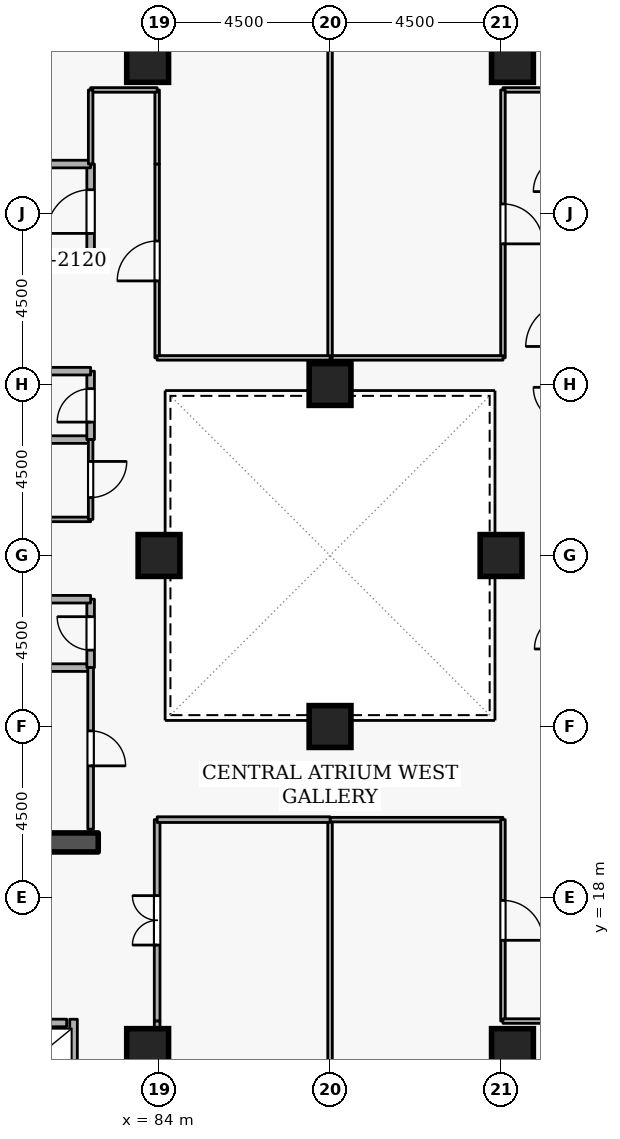
"""IFC4 building model, lengths in metres.
Left out: names, types, materials, properties, quantities, classifications, styles, units other than length and angle.
Written with IfcOpenShell. Run it as: python <this file> out.ifc"""

import sys

from ifc_helpers import new_model, si_unit, direction, frame, frame_2d, origin, origin_2d, place, context, subcontext, project, spatial, rectangle, extrude, element, fill, save


model = new_model("IFC4")
c1 = context("Model", 3, precision=1e-05, world=origin(), true_north=direction((0.0, 1.0)))
c2 = subcontext(c1, "Body", "Model", "MODEL_VIEW")
j1 = project(units=[si_unit("LENGTHUNIT", "METRE"), si_unit("PLANEANGLEUNIT", "RADIAN")], contexts=[c1])
p1 = place(None, origin())
s1 = spatial("IfcSite", under=j1, at=p1, CompositionType="ELEMENT")
p2 = place(p1, origin())
s2 = spatial("IfcBuilding", under=s1, at=p2, CompositionType="ELEMENT")
p3 = place(p2, frame((0.0, 0.0, 178.5)))
s3 = spatial("IfcBuildingStorey", under=s2, at=p3, CompositionType="ELEMENT", Elevation=178.5)
p4 = place(p3, frame((76.6, 19.45, 0.0), z_axis=(0.0, 0.0, 1.0), x_axis=(1.0, 0.0, 0.0)))
e1 = element("IfcWall", 1, at=p4, inside=s3, PredefinedType="SHEAR", context=c2, shape_type="SweptSolid", body=[
    extrude(rectangle(XDim=5.8, YDim=0.5, at=frame_2d((2.9, 0.0))), origin(), (0.0, 0.0, 1.0), 3.6),
])
for number, where, z_axis, x_axis in (
    (2, (93.3, 14.0, 0.0), (0.0, 0.0, 1.0), (1.0, 0.0, 0.0)),
    (3, (93.3, 40.0, 0.0), (0.0, 0.0, 1.0), (1.0, 0.0, 0.0)),
    (4, (83.7, 14.0, 0.0), (0.0, 0.0, 1.0), (1.0, 0.0, 0.0)),
    (5, (83.7, 40.0, 0.0), (0.0, 0.0, 1.0), (1.0, 0.0, 0.0)),
    (6, (93.0, 27.0, 0.0), (0.0, 0.0, 1.0), (1.0, 0.0, 0.0)),
    (7, (84.0, 27.0, 0.0), (0.0, 0.0, 1.0), (1.0, 0.0, 0.0)),
    (8, (88.5, 22.5, 0.0), (0.0, 0.0, 1.0), (1.0, 0.0, 0.0)),
    (9, (88.5, 31.5, 0.0), (0.0, 0.0, 1.0), (1.0, 0.0, 0.0)),
):
    element("IfcColumn", number, at=place(p3, frame(where, z_axis=z_axis, x_axis=x_axis)), inside=s3, PredefinedType="COLUMN", context=c2, shape_type="SweptSolid", body=[
        extrude(rectangle(XDim=1.1, YDim=1.1, at=origin_2d()), origin(), (0.0, 0.0, 1.0), 3.6),
    ])
p5 = place(p3, frame((79.63, 14.7, 0.0), z_axis=(0.0, 0.0, 1.0), x_axis=(1.0, 0.0, 0.0)))
e10 = element("IfcWall", 10, at=p5, inside=s3, PredefinedType="STANDARD", context=c2, shape_type="SweptSolid", body=[
    extrude(rectangle(XDim=1.94, YDim=0.2, at=frame_2d((0.97, 0.0))), origin(), (0.0, 0.0, 1.0), 3.34),
])
p6 = place(p5, frame((0.46, 0.0, 0.0)))
e11 = element("IfcOpeningElement", 11, at=p6, cuts=e10, PredefinedType="OPENING", context=c2, shape_type="SweptSolid", body=[
    extrude(rectangle(XDim=1.02, YDim=2.06, at=frame_2d((0.51, 1.03))), frame((0.0, 0.11, 0.0), z_axis=(0.0, -1.0, 0.0), x_axis=(1.0, 0.0, 0.0)), (0.0, 0.0, 1.0), 0.22),
])
p7 = place(p3, frame((81.75, 12.612, 0.0), z_axis=(0.0, 0.0, 1.0), x_axis=(0.0, 1.0, 0.0)))
e12 = element("IfcWall", 12, at=p7, inside=s3, PredefinedType="STANDARD", context=c2, shape_type="SweptSolid", body=[
    extrude(rectangle(XDim=2.186, YDim=0.2, at=frame_2d((1.093, 0.0))), origin(), (0.0, 0.0, 1.0), 3.34),
])
p8 = place(p3, frame((79.9, 34.8, 0.0), z_axis=(0.0, 0.0, 1.0), x_axis=(1.0, 0.0, 0.0)))
e13 = element("IfcWall", 13, at=p8, inside=s3, PredefinedType="STANDARD", context=c2, shape_type="SweptSolid", body=[
    extrude(rectangle(XDim=2.3, YDim=0.2, at=frame_2d((1.15, 0.0))), origin(), (0.0, 0.0, 1.0), 2.545),
])
p9 = place(p3, frame((82.2, 34.8, 0.0), z_axis=(0.0, 0.0, 1.0), x_axis=(0.0, 1.0, 0.0)))
e14 = element("IfcWall", 14, at=p9, inside=s3, PredefinedType="STANDARD", context=c2, shape_type="SweptSolid", body=[
    extrude(rectangle(XDim=2.5, YDim=0.2, at=frame_2d((1.25, 0.0))), origin(), (0.0, 0.0, 1.0), 3.34),
])
p10 = place(p9, frame((0.675, 0.0, 0.0)))
e15 = element("IfcOpeningElement", 15, at=p10, cuts=e14, PredefinedType="OPENING", context=c2, shape_type="SweptSolid", body=[
    extrude(rectangle(XDim=1.15, YDim=2.1, at=frame_2d((0.575, 1.05))), frame((0.0, 0.11, 0.0), z_axis=(0.0, -1.0, 0.0), x_axis=(1.0, 0.0, 0.0)), (0.0, 0.0, 1.0), 0.22),
])
p11 = place(p3, frame((82.2, 37.3, 0.0), z_axis=(0.0, 0.0, 1.0), x_axis=(-1.0, 0.0, 0.0)))
e16 = element("IfcWall", 16, at=p11, inside=s3, PredefinedType="STANDARD", context=c2, shape_type="SweptSolid", body=[
    extrude(rectangle(XDim=5.7, YDim=0.2, at=frame_2d((2.85, 0.0))), origin(), (0.0, 0.0, 1.0), 3.34),
])
p12 = place(p3, frame((80.15, 24.05, 0.0), z_axis=(0.0, 0.0, 1.0), x_axis=(1.0, 0.0, 0.0)))
e17 = element("IfcWall", 17, at=p12, inside=s3, PredefinedType="STANDARD", context=c2, shape_type="SweptSolid", body=[
    extrude(rectangle(XDim=2.05, YDim=0.2, at=frame_2d((1.025, 0.0))), origin(), (0.0, 0.0, 1.0), 3.34),
])
p13 = place(p3, frame((82.2, 24.05, 0.0), z_axis=(0.0, 0.0, 1.0), x_axis=(0.0, 1.0, 0.0)))
e18 = element("IfcWall", 18, at=p13, inside=s3, PredefinedType="STANDARD", context=c2, shape_type="SweptSolid", body=[
    extrude(rectangle(XDim=1.8, YDim=0.2, at=frame_2d((0.9, 0.0))), origin(), (0.0, 0.0, 1.0), 3.34),
])
p14 = place(p13, frame((0.46, 0.0, 0.0)))
e19 = element("IfcOpeningElement", 19, at=p14, cuts=e18, PredefinedType="OPENING", context=c2, shape_type="SweptSolid", body=[
    extrude(rectangle(XDim=0.88, YDim=2.04, at=frame_2d((0.44, 1.02))), frame((0.0, 0.11, 0.0), z_axis=(0.0, -1.0, 0.0), x_axis=(1.0, 0.0, 0.0)), (0.0, 0.0, 1.0), 0.22),
])
for number, where, z_axis, x_axis in (
    (20, (82.2, 25.85, 0.0), (0.0, 0.0, 1.0), (-1.0, 0.0, 0.0)),
    (21, (80.15, 30.05, 0.0), (0.0, 0.0, 1.0), (1.0, 0.0, 0.0)),
):
    element("IfcWall", number, at=place(p3, frame(where, z_axis=z_axis, x_axis=x_axis)), inside=s3, PredefinedType="STANDARD", context=c2, shape_type="SweptSolid", body=[
        extrude(rectangle(XDim=2.05, YDim=0.2, at=frame_2d((1.025, 0.0))), origin(), (0.0, 0.0, 1.0), 3.34),
    ])
p15 = place(p3, frame((82.2, 30.05, 0.0), z_axis=(0.0, 0.0, 1.0), x_axis=(0.0, 1.0, 0.0)))
e22 = element("IfcWall", 22, at=p15, inside=s3, PredefinedType="STANDARD", context=c2, shape_type="SweptSolid", body=[
    extrude(rectangle(XDim=1.8, YDim=0.2, at=frame_2d((0.9, 0.0))), origin(), (0.0, 0.0, 1.0), 3.34),
])
p16 = place(p15, frame((0.46, 0.0, 0.0)))
e23 = element("IfcOpeningElement", 23, at=p16, cuts=e22, PredefinedType="OPENING", context=c2, shape_type="SweptSolid", body=[
    extrude(rectangle(XDim=0.88, YDim=2.04, at=frame_2d((0.44, 1.02))), frame((0.0, 0.11, 0.0), z_axis=(0.0, -1.0, 0.0), x_axis=(1.0, 0.0, 0.0)), (0.0, 0.0, 1.0), 0.22),
])
p17 = place(p3, frame((82.2, 31.85, 0.0), z_axis=(0.0, 0.0, 1.0), x_axis=(-1.0, 0.0, 0.0)))
e24 = element("IfcWall", 24, at=p17, inside=s3, PredefinedType="STANDARD", context=c2, shape_type="SweptSolid", body=[
    extrude(rectangle(XDim=2.05, YDim=0.2, at=frame_2d((1.025, 0.0))), origin(), (0.0, 0.0, 1.0), 3.34),
])
p18 = place(p3, frame((82.2, 24.05, 0.0), z_axis=(0.0, 0.0, 1.0), x_axis=(0.0, -1.0, 0.0)))
e25 = element("IfcWall", 25, at=p18, inside=s3, PredefinedType="PARTITIONING", context=c2, shape_type="SweptSolid", body=[
    extrude(rectangle(XDim=4.25, YDim=0.15, at=frame_2d((2.125, 0.0))), origin(), (0.0, 0.0, 1.0), 3.34),
])
p19 = place(p18, frame((1.665, 0.0, 0.0)))
e26 = element("IfcOpeningElement", 26, at=p19, cuts=e25, PredefinedType="OPENING", context=c2, shape_type="SweptSolid", body=[
    extrude(rectangle(XDim=0.92, YDim=2.08, at=frame_2d((0.46, 1.04))), frame((0.0, 0.085, 0.0), z_axis=(0.0, -1.0, 0.0), x_axis=(1.0, 0.0, 0.0)), (0.0, 0.0, 1.0), 0.17),
])
p20 = place(p3, frame((82.2, 27.95, 0.0), z_axis=(0.0, 0.0, 1.0), x_axis=(-1.0, 0.0, 0.0)))
e27 = element("IfcWall", 27, at=p20, inside=s3, PredefinedType="PARTITIONING", context=c2, shape_type="SweptSolid", body=[
    extrude(rectangle(XDim=2.05, YDim=0.12, at=frame_2d((1.025, 0.0))), origin(), (0.0, 0.0, 1.0), 3.34),
])
p21 = place(p3, frame((82.2, 30.05, 0.0), z_axis=(0.0, 0.0, 1.0), x_axis=(0.0, -1.0, 0.0)))
e28 = element("IfcWall", 28, at=p21, inside=s3, PredefinedType="PARTITIONING", context=c2, shape_type="SweptSolid", body=[
    extrude(rectangle(XDim=2.1, YDim=0.12, at=frame_2d((1.05, 0.0))), origin(), (0.0, 0.0, 1.0), 3.34),
])
p22 = place(p21, frame((0.575, 0.0, 0.0)))
e29 = element("IfcOpeningElement", 29, at=p22, cuts=e28, PredefinedType="OPENING", context=c2, shape_type="SweptSolid", body=[
    extrude(rectangle(XDim=0.95, YDim=2.1, at=frame_2d((0.475, 1.05))), frame((0.0, 0.07, 0.0), z_axis=(0.0, -1.0, 0.0), x_axis=(1.0, 0.0, 0.0)), (0.0, 0.0, 1.0), 0.14),
])
p23 = place(p3, frame((88.5, 9.28, 0.0), z_axis=(0.0, 0.0, 1.0), x_axis=(0.0, 1.0, 0.0)))
e30 = element("IfcWall", 30, at=p23, inside=s3, PredefinedType="PARTITIONING", context=c2, shape_type="SweptSolid", body=[
    extrude(rectangle(XDim=10.77, YDim=0.12, at=frame_2d((5.385, 0.0))), origin(), (0.0, 0.0, 1.0), 2.932),
])
p24 = place(p3, frame((88.5, 20.05, 0.0), z_axis=(0.0, 0.0, 1.0), x_axis=(1.0, 0.0, 0.0)))
e31 = element("IfcWall", 31, at=p24, inside=s3, PredefinedType="PARTITIONING", context=c2, shape_type="SweptSolid", body=[
    extrude(rectangle(XDim=4.55, YDim=0.12, at=frame_2d((2.275, 0.0))), origin(), (0.0, 0.0, 1.0), 3.34),
])
p25 = place(p3, frame((93.05, 20.05, 0.0), z_axis=(0.0, 0.0, 1.0), x_axis=(0.0, -1.0, 0.0)))
e32 = element("IfcWall", 32, at=p25, inside=s3, PredefinedType="PARTITIONING", context=c2, shape_type="SweptSolid", body=[
    extrude(rectangle(XDim=5.3, YDim=0.12, at=frame_2d((2.65, 0.0))), origin(), (0.0, 0.0, 1.0), 3.34),
])
p26 = place(p25, frame((2.125, 0.0, 0.0)))
e33 = element("IfcOpeningElement", 33, at=p26, cuts=e32, PredefinedType="OPENING", context=c2, shape_type="SweptSolid", body=[
    extrude(rectangle(XDim=1.05, YDim=2.1, at=frame_2d((0.525, 1.05))), frame((0.0, 0.07, 0.0), z_axis=(0.0, -1.0, 0.0), x_axis=(1.0, 0.0, 0.0)), (0.0, 0.0, 1.0), 0.14),
])
p27 = place(p3, frame((93.05, 14.75, 0.0), z_axis=(0.0, 0.0, 1.0), x_axis=(1.0, 0.0, 0.0)))
e34 = element("IfcWall", 34, at=p27, inside=s3, PredefinedType="PARTITIONING", context=c2, shape_type="SweptSolid", body=[
    extrude(rectangle(XDim=1.75, YDim=0.12, at=frame_2d((0.875, 0.0))), origin(), (0.0, 0.0, 1.0), 3.34),
])
p28 = place(p3, frame((83.95, 14.75, 0.0), z_axis=(0.0, 0.0, 1.0), x_axis=(0.0, 1.0, 0.0)))
e35 = element("IfcWall", 35, at=p28, inside=s3, PredefinedType="PARTITIONING", context=c2, shape_type="SweptSolid", body=[
    extrude(rectangle(XDim=5.3, YDim=0.15, at=frame_2d((2.65, 0.0))), origin(), (0.0, 0.0, 1.0), 3.34),
])
p29 = place(p28, frame((2.0, 0.0, 0.0)))
e36 = element("IfcOpeningElement", 36, at=p29, cuts=e35, PredefinedType="OPENING", context=c2, shape_type="SweptSolid", body=[
    extrude(rectangle(XDim=1.3, YDim=2.12, at=frame_2d((0.65, 1.06))), frame((0.0, 0.085, 0.0), z_axis=(0.0, -1.0, 0.0), x_axis=(1.0, 0.0, 0.0)), (0.0, 0.0, 1.0), 0.17),
])
p30 = place(p3, frame((83.95, 20.05, 0.0), z_axis=(0.0, 0.0, 1.0), x_axis=(1.0, 0.0, 0.0)))
e37 = element("IfcWall", 37, at=p30, inside=s3, PredefinedType="PARTITIONING", context=c2, shape_type="SweptSolid", body=[
    extrude(rectangle(XDim=4.55, YDim=0.15, at=frame_2d((2.275, 0.0))), origin(), (0.0, 0.0, 1.0), 3.34),
])
p31 = place(p3, frame((83.95, 12.4, 0.0), z_axis=(0.0, 0.0, 1.0), x_axis=(0.0, 1.0, 0.0)))
e38 = element("IfcWall", 38, at=p31, inside=s3, PredefinedType="PARTITIONING", context=c2, shape_type="SweptSolid", body=[
    extrude(rectangle(XDim=2.35, YDim=0.15, at=frame_2d((1.175, 0.0))), origin(), (0.0, 0.0, 1.0), 3.34),
])
p32 = place(p3, frame((94.8, 39.25, 0.0), z_axis=(0.0, 0.0, 1.0), x_axis=(-1.0, 0.0, 0.0)))
e39 = element("IfcWall", 39, at=p32, inside=s3, PredefinedType="PARTITIONING", context=c2, shape_type="SweptSolid", body=[
    extrude(rectangle(XDim=1.75, YDim=0.12, at=frame_2d((0.875, 0.0))), origin(), (0.0, 0.0, 1.0), 3.34),
])
p33 = place(p3, frame((93.05, 39.25, 0.0), z_axis=(0.0, 0.0, 1.0), x_axis=(0.0, -1.0, 0.0)))
e40 = element("IfcWall", 40, at=p33, inside=s3, PredefinedType="PARTITIONING", context=c2, shape_type="SweptSolid", body=[
    extrude(rectangle(XDim=7.05, YDim=0.12, at=frame_2d((3.525, 0.0))), origin(), (0.0, 0.0, 1.0), 3.34),
])
p34 = place(p33, frame((3.0, 0.0, 0.0)))
e41 = element("IfcOpeningElement", 41, at=p34, cuts=e40, PredefinedType="OPENING", context=c2, shape_type="SweptSolid", body=[
    extrude(rectangle(XDim=1.05, YDim=2.1, at=frame_2d((0.525, 1.05))), frame((0.0, 0.07, 0.0), z_axis=(0.0, -1.0, 0.0), x_axis=(1.0, 0.0, 0.0)), (0.0, 0.0, 1.0), 0.14),
])
p35 = place(p3, frame((93.05, 32.2, 0.0), z_axis=(0.0, 0.0, 1.0), x_axis=(-1.0, 0.0, 0.0)))
e42 = element("IfcWall", 42, at=p35, inside=s3, PredefinedType="PARTITIONING", context=c2, shape_type="SweptSolid", body=[
    extrude(rectangle(XDim=4.55, YDim=0.12, at=frame_2d((2.275, 0.0))), origin(), (0.0, 0.0, 1.0), 3.34),
])
p36 = place(p3, frame((88.5, 32.2, 0.0), z_axis=(0.0, 0.0, 1.0), x_axis=(0.0, 1.0, 0.0)))
e43 = element("IfcWall", 43, at=p36, inside=s3, PredefinedType="PARTITIONING", context=c2, shape_type="SweptSolid", body=[
    extrude(rectangle(XDim=18.52, YDim=0.12, at=frame_2d((9.26, 0.0))), origin(), (0.0, 0.0, 1.0), 2.932),
])
p37 = place(p3, frame((83.95, 32.2, 0.0), z_axis=(0.0, 0.0, 1.0), x_axis=(0.0, 1.0, 0.0)))
e44 = element("IfcWall", 44, at=p37, inside=s3, PredefinedType="PARTITIONING", context=c2, shape_type="SweptSolid", body=[
    extrude(rectangle(XDim=5.1, YDim=0.12, at=frame_2d((2.55, 0.0))), origin(), (0.0, 0.0, 1.0), 3.34),
])
p38 = place(p37, frame((2.025, 0.0, 0.0)))
e45 = element("IfcOpeningElement", 45, at=p38, cuts=e44, PredefinedType="OPENING", context=c2, shape_type="SweptSolid", body=[
    extrude(rectangle(XDim=1.05, YDim=2.1, at=frame_2d((0.525, 1.05))), frame((0.0, 0.07, 0.0), z_axis=(0.0, -1.0, 0.0), x_axis=(1.0, 0.0, 0.0)), (0.0, 0.0, 1.0), 0.14),
])
p39 = place(p3, frame((83.95, 37.3, 0.0), z_axis=(0.0, 0.0, 1.0), x_axis=(0.0, 1.0, 0.0)))
e46 = element("IfcWall", 46, at=p39, inside=s3, PredefinedType="PARTITIONING", context=c2, shape_type="SweptSolid", body=[
    extrude(rectangle(XDim=1.95, YDim=0.12, at=frame_2d((0.975, 0.0))), origin(), (0.0, 0.0, 1.0), 3.34),
])
p40 = place(p3, frame((83.95, 39.25, 0.0), z_axis=(0.0, 0.0, 1.0), x_axis=(-1.0, 0.0, 0.0)))
e47 = element("IfcWall", 47, at=p40, inside=s3, PredefinedType="PARTITIONING", context=c2, shape_type="SweptSolid", body=[
    extrude(rectangle(XDim=1.75, YDim=0.12, at=frame_2d((0.875, 0.0))), origin(), (0.0, 0.0, 1.0), 3.34),
])
p41 = place(p3, frame((82.2, 39.25, 0.0), z_axis=(0.0, 0.0, 1.0), x_axis=(0.0, -1.0, 0.0)))
e48 = element("IfcWall", 48, at=p41, inside=s3, PredefinedType="PARTITIONING", context=c2, shape_type="SweptSolid", body=[
    extrude(rectangle(XDim=1.95, YDim=0.12, at=frame_2d((0.975, 0.0))), origin(), (0.0, 0.0, 1.0), 3.34),
])
p42 = place(p3, frame((88.5, 32.2, 0.0), z_axis=(0.0, 0.0, 1.0), x_axis=(-1.0, 0.0, 0.0)))
e49 = element("IfcWall", 49, at=p42, inside=s3, PredefinedType="PARTITIONING", context=c2, shape_type="SweptSolid", body=[
    extrude(rectangle(XDim=4.55, YDim=0.12, at=frame_2d((2.275, 0.0))), origin(), (0.0, 0.0, 1.0), 3.34),
])
p43 = place(p10, origin())
e50 = element("IfcDoor", 50, at=p43, inside=s3, OperationType="SINGLE_SWING_LEFT", PredefinedType="DOOR", context=c2, shape_type="SweptSolid", body=[
    extrude(rectangle(XDim=1.15, YDim=2.1, at=frame_2d((0.575, 1.05))), frame((0.0, 0.025, 0.0), z_axis=(0.0, -1.0, 0.0), x_axis=(1.0, 0.0, 0.0)), (0.0, 0.0, 1.0), 0.05),
])
fill(e15, e50)
p44 = place(p14, origin())
e51 = element("IfcDoor", 51, at=p44, inside=s3, OperationType="SINGLE_SWING_RIGHT", PredefinedType="DOOR", context=c2, shape_type="SweptSolid", body=[
    extrude(rectangle(XDim=0.88, YDim=2.04, at=frame_2d((0.44, 1.02))), frame((0.0, 0.025, 0.0), z_axis=(0.0, -1.0, 0.0), x_axis=(1.0, 0.0, 0.0)), (0.0, 0.0, 1.0), 0.05),
])
fill(e19, e51)
p45 = place(p16, origin())
e52 = element("IfcDoor", 52, at=p45, inside=s3, OperationType="SINGLE_SWING_LEFT", PredefinedType="DOOR", context=c2, shape_type="SweptSolid", body=[
    extrude(rectangle(XDim=0.88, YDim=2.04, at=frame_2d((0.44, 1.02))), frame((0.0, 0.025, 0.0), z_axis=(0.0, -1.0, 0.0), x_axis=(1.0, 0.0, 0.0)), (0.0, 0.0, 1.0), 0.05),
])
fill(e23, e52)
p46 = place(p19, origin())
e53 = element("IfcDoor", 53, at=p46, inside=s3, OperationType="SINGLE_SWING_RIGHT", PredefinedType="DOOR", context=c2, shape_type="SweptSolid", body=[
    extrude(rectangle(XDim=0.92, YDim=2.08, at=frame_2d((0.46, 1.04))), frame((0.0, 0.025, 0.0), z_axis=(0.0, -1.0, 0.0), x_axis=(1.0, 0.0, 0.0)), (0.0, 0.0, 1.0), 0.05),
])
fill(e26, e53)
p47 = place(p22, origin())
e54 = element("IfcDoor", 54, at=p47, inside=s3, OperationType="SINGLE_SWING_LEFT", PredefinedType="DOOR", context=c2, shape_type="SweptSolid", body=[
    extrude(rectangle(XDim=0.95, YDim=2.1, at=frame_2d((0.475, 1.05))), frame((0.0, 0.025, 0.0), z_axis=(0.0, -1.0, 0.0), x_axis=(1.0, 0.0, 0.0)), (0.0, 0.0, 1.0), 0.05),
])
fill(e29, e54)
p48 = place(p26, origin())
e55 = element("IfcDoor", 55, at=p48, inside=s3, OperationType="SINGLE_SWING_RIGHT", PredefinedType="DOOR", context=c2, shape_type="SweptSolid", body=[
    extrude(rectangle(XDim=1.05, YDim=2.1, at=frame_2d((0.525, 1.05))), frame((0.0, 0.025, 0.0), z_axis=(0.0, -1.0, 0.0), x_axis=(1.0, 0.0, 0.0)), (0.0, 0.0, 1.0), 0.05),
])
fill(e33, e55)
p49 = place(p29, origin())
e56 = element("IfcDoor", 56, at=p49, inside=s3, OperationType="DOUBLE_DOOR_SINGLE_SWING", PredefinedType="DOOR", context=c2, shape_type="SweptSolid", body=[
    extrude(rectangle(XDim=1.3, YDim=2.12, at=frame_2d((0.65, 1.06))), frame((0.0, 0.025, 0.0), z_axis=(0.0, -1.0, 0.0), x_axis=(1.0, 0.0, 0.0)), (0.0, 0.0, 1.0), 0.05),
])
fill(e36, e56)
p50 = place(p34, origin())
e57 = element("IfcDoor", 57, at=p50, inside=s3, OperationType="SINGLE_SWING_RIGHT", PredefinedType="DOOR", context=c2, shape_type="SweptSolid", body=[
    extrude(rectangle(XDim=1.05, YDim=2.1, at=frame_2d((0.525, 1.05))), frame((0.0, 0.025, 0.0), z_axis=(0.0, -1.0, 0.0), x_axis=(1.0, 0.0, 0.0)), (0.0, 0.0, 1.0), 0.05),
])
fill(e41, e57)
p51 = place(p38, origin())
e58 = element("IfcDoor", 58, at=p51, inside=s3, OperationType="SINGLE_SWING_LEFT", PredefinedType="DOOR", context=c2, shape_type="SweptSolid", body=[
    extrude(rectangle(XDim=1.05, YDim=2.1, at=frame_2d((0.525, 1.05))), frame((0.0, 0.025, 0.0), z_axis=(0.0, -1.0, 0.0), x_axis=(1.0, 0.0, 0.0)), (0.0, 0.0, 1.0), 0.05),
])
fill(e45, e58)
save(model, sys.argv[1])
